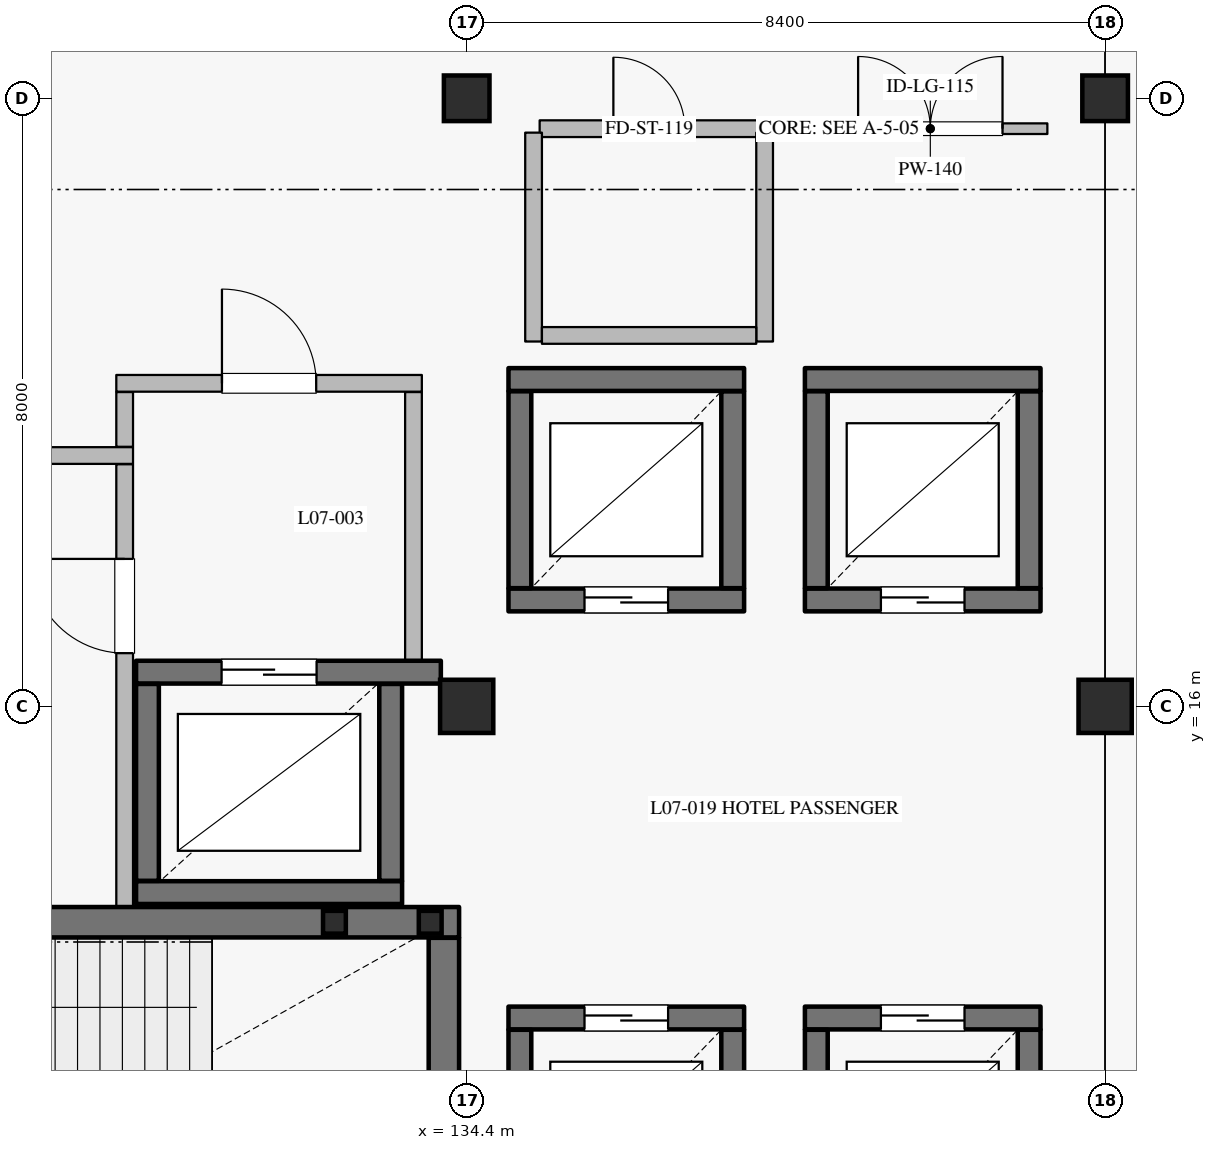
"""IFC4 building model, lengths in metres.
Left out: names, types, materials, properties, quantities, classifications, styles, units other than length and angle.
Written with IfcOpenShell. Run it as: python <this file> out.ifc"""

import sys

from ifc_helpers import new_model, si_unit, direction, frame, frame_2d, origin, origin_2d, place, context, subcontext, project, spatial, rectangle, hollow_rectangle, extrude, element, fill, save


model = new_model("IFC4")
c1 = context("Model", 3, precision=1e-05, world=origin(), true_north=direction((0.0, 1.0)))
c2 = subcontext(c1, "Body", "Model", "MODEL_VIEW")
j1 = project(units=[si_unit("LENGTHUNIT", "METRE"), si_unit("PLANEANGLEUNIT", "RADIAN")], contexts=[c1])
p1 = place(None, origin())
s1 = spatial("IfcSite", under=j1, at=p1, CompositionType="ELEMENT")
p2 = place(p1, origin())
s2 = spatial("IfcBuilding", under=s1, at=p2, CompositionType="ELEMENT")
p3 = place(p2, frame((0.0, 0.0, 32.4)))
s3 = spatial("IfcBuildingStorey", under=s2, at=p3, CompositionType="ELEMENT", Elevation=32.4)
for number, where, z_axis, x_axis in (
    (1, (134.4, 16.0, 0.0), (0.0, 0.0, 1.0), (1.0, 0.0, 0.0)),
    (2, (142.8, 16.0, 0.0), (0.0, 0.0, 1.0), (1.0, 0.0, 0.0)),
):
    element("IfcColumn", number, at=place(p3, frame(where, z_axis=z_axis, x_axis=x_axis)), inside=s3, PredefinedType="COLUMN", context=c2, shape_type="SweptSolid", body=[
        extrude(rectangle(XDim=0.7, YDim=0.7, at=origin_2d()), origin(), (0.0, 0.0, 1.0), 3.6),
    ])
for number, where, z_axis, x_axis in (
    (3, (134.4, 24.0, 0.0), (0.0, 0.0, 1.0), (1.0, 0.0, 0.0)),
    (4, (142.8, 24.0, 0.0), (0.0, 0.0, 1.0), (1.0, 0.0, 0.0)),
):
    element("IfcColumn", number, at=place(p3, frame(where, z_axis=z_axis, x_axis=x_axis)), inside=s3, PredefinedType="COLUMN", context=c2, shape_type="SweptSolid", body=[
        extrude(rectangle(XDim=0.6, YDim=0.6, at=origin_2d()), origin(), (0.0, 0.0, 1.0), 3.6),
    ])
p4 = place(p3, frame((134.95, 17.4, 0.0), z_axis=(0.0, 0.0, 1.0), x_axis=(1.0, 0.0, 0.0)))
e5 = element("IfcWall", 5, at=p4, inside=s3, PredefinedType="SHEAR", context=c2, shape_type="SweptSolid", body=[
    extrude(rectangle(XDim=3.1, YDim=0.3, at=frame_2d((1.55, 0.0))), origin(), (0.0, 0.0, 1.0), 3.335),
])
p5 = place(p4, frame((1.0, 0.0, 0.0)))
e6 = element("IfcOpeningElement", 6, at=p5, cuts=e5, PredefinedType="OPENING", context=c2, shape_type="SweptSolid", body=[
    extrude(rectangle(XDim=1.1, YDim=2.2, at=frame_2d((0.55, 1.1))), frame((0.0, 0.16, 0.0), z_axis=(0.0, -1.0, 0.0), x_axis=(1.0, 0.0, 0.0)), (0.0, 0.0, 1.0), 0.32),
])
p6 = place(p3, frame((137.9, 17.555, 0.0), z_axis=(0.0, 0.0, 1.0), x_axis=(0.0, 1.0, 0.0)))
e7 = element("IfcWall", 7, at=p6, inside=s3, PredefinedType="SHEAR", context=c2, shape_type="SweptSolid", body=[
    extrude(rectangle(XDim=2.59, YDim=0.3, at=frame_2d((1.295, 0.0))), origin(), (0.0, 0.0, 1.0), 3.335),
])
p7 = place(p3, frame((138.05, 20.3, 0.0), z_axis=(0.0, 0.0, 1.0), x_axis=(-1.0, 0.0, 0.0)))
e8 = element("IfcWall", 8, at=p7, inside=s3, PredefinedType="SHEAR", context=c2, shape_type="SweptSolid", body=[
    extrude(rectangle(XDim=3.1, YDim=0.3, at=frame_2d((1.55, 0.0))), origin(), (0.0, 0.0, 1.0), 3.335),
])
p8 = place(p3, frame((135.1, 20.145, 0.0), z_axis=(0.0, 0.0, 1.0), x_axis=(0.0, -1.0, 0.0)))
e9 = element("IfcWall", 9, at=p8, inside=s3, PredefinedType="SHEAR", context=c2, shape_type="SweptSolid", body=[
    extrude(rectangle(XDim=2.59, YDim=0.3, at=frame_2d((1.295, 0.0))), origin(), (0.0, 0.0, 1.0), 3.335),
])
p9 = place(p3, frame((138.85, 17.4, 0.0), z_axis=(0.0, 0.0, 1.0), x_axis=(1.0, 0.0, 0.0)))
e10 = element("IfcWall", 10, at=p9, inside=s3, PredefinedType="SHEAR", context=c2, shape_type="SweptSolid", body=[
    extrude(rectangle(XDim=3.1, YDim=0.3, at=frame_2d((1.55, 0.0))), origin(), (0.0, 0.0, 1.0), 3.335),
])
p10 = place(p9, frame((1.0, 0.0, 0.0)))
e11 = element("IfcOpeningElement", 11, at=p10, cuts=e10, PredefinedType="OPENING", context=c2, shape_type="SweptSolid", body=[
    extrude(rectangle(XDim=1.1, YDim=2.2, at=frame_2d((0.55, 1.1))), frame((0.0, 0.16, 0.0), z_axis=(0.0, -1.0, 0.0), x_axis=(1.0, 0.0, 0.0)), (0.0, 0.0, 1.0), 0.32),
])
p11 = place(p3, frame((141.8, 17.555, 0.0), z_axis=(0.0, 0.0, 1.0), x_axis=(0.0, 1.0, 0.0)))
e12 = element("IfcWall", 12, at=p11, inside=s3, PredefinedType="SHEAR", context=c2, shape_type="SweptSolid", body=[
    extrude(rectangle(XDim=2.59, YDim=0.3, at=frame_2d((1.295, 0.0))), origin(), (0.0, 0.0, 1.0), 3.335),
])
p12 = place(p3, frame((141.95, 20.3, 0.0), z_axis=(0.0, 0.0, 1.0), x_axis=(-1.0, 0.0, 0.0)))
e13 = element("IfcWall", 13, at=p12, inside=s3, PredefinedType="SHEAR", context=c2, shape_type="SweptSolid", body=[
    extrude(rectangle(XDim=3.1, YDim=0.3, at=frame_2d((1.55, 0.0))), origin(), (0.0, 0.0, 1.0), 3.335),
])
for number, where, z_axis, x_axis in (
    (14, (139.0, 20.145, 0.0), (0.0, 0.0, 1.0), (0.0, -1.0, 0.0)),
    (15, (137.9, 9.155, 0.0), (0.0, 0.0, 1.0), (0.0, 1.0, 0.0)),
):
    element("IfcWall", number, at=place(p3, frame(where, z_axis=z_axis, x_axis=x_axis)), inside=s3, PredefinedType="SHEAR", context=c2, shape_type="SweptSolid", body=[
        extrude(rectangle(XDim=2.59, YDim=0.3, at=frame_2d((1.295, 0.0))), origin(), (0.0, 0.0, 1.0), 3.335),
    ])
p13 = place(p3, frame((138.05, 11.9, 0.0), z_axis=(0.0, 0.0, 1.0), x_axis=(-1.0, 0.0, 0.0)))
e16 = element("IfcWall", 16, at=p13, inside=s3, PredefinedType="SHEAR", context=c2, shape_type="SweptSolid", body=[
    extrude(rectangle(XDim=3.1, YDim=0.3, at=frame_2d((1.55, 0.0))), origin(), (0.0, 0.0, 1.0), 3.335),
])
p14 = place(p13, frame((1.0, 0.0, 0.0)))
e17 = element("IfcOpeningElement", 17, at=p14, cuts=e16, PredefinedType="OPENING", context=c2, shape_type="SweptSolid", body=[
    extrude(rectangle(XDim=1.1, YDim=2.2, at=frame_2d((0.55, 1.1))), frame((0.0, 0.16, 0.0), z_axis=(0.0, -1.0, 0.0), x_axis=(1.0, 0.0, 0.0)), (0.0, 0.0, 1.0), 0.32),
])
for number, where, z_axis, x_axis in (
    (18, (135.1, 11.745, 0.0), (0.0, 0.0, 1.0), (0.0, -1.0, 0.0)),
    (19, (141.8, 9.155, 0.0), (0.0, 0.0, 1.0), (0.0, 1.0, 0.0)),
):
    element("IfcWall", number, at=place(p3, frame(where, z_axis=z_axis, x_axis=x_axis)), inside=s3, PredefinedType="SHEAR", context=c2, shape_type="SweptSolid", body=[
        extrude(rectangle(XDim=2.59, YDim=0.3, at=frame_2d((1.295, 0.0))), origin(), (0.0, 0.0, 1.0), 3.335),
    ])
p15 = place(p3, frame((141.95, 11.9, 0.0), z_axis=(0.0, 0.0, 1.0), x_axis=(-1.0, 0.0, 0.0)))
e20 = element("IfcWall", 20, at=p15, inside=s3, PredefinedType="SHEAR", context=c2, shape_type="SweptSolid", body=[
    extrude(rectangle(XDim=3.1, YDim=0.3, at=frame_2d((1.55, 0.0))), origin(), (0.0, 0.0, 1.0), 3.335),
])
p16 = place(p15, frame((1.0, 0.0, 0.0)))
e21 = element("IfcOpeningElement", 21, at=p16, cuts=e20, PredefinedType="OPENING", context=c2, shape_type="SweptSolid", body=[
    extrude(rectangle(XDim=1.1, YDim=2.2, at=frame_2d((0.55, 1.1))), frame((0.0, 0.16, 0.0), z_axis=(0.0, -1.0, 0.0), x_axis=(1.0, 0.0, 0.0)), (0.0, 0.0, 1.0), 0.32),
])
p17 = place(p3, frame((139.0, 11.745, 0.0), z_axis=(0.0, 0.0, 1.0), x_axis=(0.0, -1.0, 0.0)))
e22 = element("IfcWall", 22, at=p17, inside=s3, PredefinedType="SHEAR", context=c2, shape_type="SweptSolid", body=[
    extrude(rectangle(XDim=2.59, YDim=0.3, at=frame_2d((1.295, 0.0))), origin(), (0.0, 0.0, 1.0), 3.335),
])
p18 = place(p3, frame((130.05, 13.55, 0.0), z_axis=(0.0, 0.0, 1.0), x_axis=(1.0, 0.0, 0.0)))
e23 = element("IfcWall", 23, at=p18, inside=s3, PredefinedType="SHEAR", context=c2, shape_type="SweptSolid", body=[
    extrude(rectangle(XDim=3.5, YDim=0.3, at=frame_2d((1.75, 0.0))), origin(), (0.0, 0.0, 1.0), 3.335),
])
p19 = place(p3, frame((133.4, 13.705, 0.0), z_axis=(0.0, 0.0, 1.0), x_axis=(0.0, 1.0, 0.0)))
e24 = element("IfcWall", 24, at=p19, inside=s3, PredefinedType="SHEAR", context=c2, shape_type="SweptSolid", body=[
    extrude(rectangle(XDim=2.59, YDim=0.3, at=frame_2d((1.295, 0.0))), origin(), (0.0, 0.0, 1.0), 3.335),
])
p20 = place(p3, frame((134.06, 16.45, 0.0), z_axis=(0.0, 0.0, 1.0), x_axis=(-1.0, 0.0, 0.0)))
e25 = element("IfcWall", 25, at=p20, inside=s3, PredefinedType="SHEAR", context=c2, shape_type="SweptSolid", body=[
    extrude(rectangle(XDim=4.01, YDim=0.3, at=frame_2d((2.005, 0.0))), origin(), (0.0, 0.0, 1.0), 3.335),
])
p21 = place(p20, frame((1.635, 0.0, 0.0)))
e26 = element("IfcOpeningElement", 26, at=p21, cuts=e25, PredefinedType="OPENING", context=c2, shape_type="SweptSolid", body=[
    extrude(rectangle(XDim=1.25, YDim=2.25, at=frame_2d((0.625, 1.125))), frame((0.0, 0.16, 0.0), z_axis=(0.0, -1.0, 0.0), x_axis=(1.0, 0.0, 0.0)), (0.0, 0.0, 1.0), 0.32),
])
p22 = place(p3, frame((130.2, 16.295, 0.0), z_axis=(0.0, 0.0, 1.0), x_axis=(0.0, -1.0, 0.0)))
e27 = element("IfcWall", 27, at=p22, inside=s3, PredefinedType="SHEAR", context=c2, shape_type="SweptSolid", body=[
    extrude(rectangle(XDim=2.59, YDim=0.3, at=frame_2d((1.295, 0.0))), origin(), (0.0, 0.0, 1.0), 3.335),
])
p23 = place(p3, frame((134.1, 9.005, 0.0), z_axis=(0.0, 0.0, 1.0), x_axis=(0.0, 1.0, 0.0)))
e28 = element("IfcWall", 28, at=p23, inside=s3, PredefinedType="SHEAR", context=c2, shape_type="SweptSolid", body=[
    extrude(rectangle(XDim=3.95, YDim=0.4, at=frame_2d((1.975, 0.0))), origin(), (0.0, 0.0, 1.0), 3.335),
])
p24 = place(p3, frame((126.1, 13.16, 0.0), z_axis=(0.0, 0.0, 1.0), x_axis=(1.0, 0.0, 0.0)))
e29 = element("IfcWall", 29, at=p24, inside=s3, PredefinedType="SHEAR", context=c2, shape_type="SweptSolid", body=[
    extrude(rectangle(XDim=8.2, YDim=0.4, at=frame_2d((4.1, 0.0))), origin(), (0.0, 0.0, 1.0), 3.335),
])
p25 = place(p24, frame((0.43, 0.0, 0.0)))
e30 = element("IfcOpeningElement", 30, at=p25, cuts=e29, PredefinedType="OPENING", context=c2, shape_type="SweptSolid", body=[
    extrude(rectangle(XDim=1.16, YDim=2.2, at=frame_2d((0.58, 1.1))), frame((0.0, 0.21, 0.0), z_axis=(0.0, -1.0, 0.0), x_axis=(1.0, 0.0, 0.0)), (0.0, 0.0, 1.0), 0.42),
])
p26 = place(p3, frame((126.19, 19.3, 0.0), z_axis=(0.0, 0.0, 1.0), x_axis=(1.0, 0.0, 0.0)))
e31 = element("IfcWall", 31, at=p26, inside=s3, PredefinedType="PARTITIONING", context=c2, shape_type="SweptSolid", body=[
    extrude(rectangle(XDim=3.82, YDim=0.22, at=frame_2d((1.91, 0.0))), origin(), (0.0, 0.0, 1.0), 3.335),
])
p27 = place(p26, frame((1.35, 0.0, 0.0)))
e32 = element("IfcOpeningElement", 32, at=p27, cuts=e31, PredefinedType="OPENING", context=c2, shape_type="SweptSolid", body=[
    extrude(rectangle(XDim=1.12, YDim=2.2, at=frame_2d((0.56, 1.1))), frame((0.0, 0.12, 0.0), z_axis=(0.0, -1.0, 0.0), x_axis=(1.0, 0.0, 0.0)), (0.0, 0.0, 1.0), 0.24),
])
p28 = place(p3, frame((129.9, 13.365, 0.0), z_axis=(0.0, 0.0, 1.0), x_axis=(0.0, 1.0, 0.0)))
e33 = element("IfcWall", 33, at=p28, inside=s3, PredefinedType="PARTITIONING", context=c2, shape_type="SweptSolid", body=[
    extrude(rectangle(XDim=5.82, YDim=0.22, at=frame_2d((2.91, 0.0))), origin(), (0.0, 0.0, 1.0), 3.335),
])
p29 = place(p28, frame((3.335, 0.0, 0.0)))
e34 = element("IfcOpeningElement", 34, at=p29, cuts=e33, PredefinedType="OPENING", context=c2, shape_type="SweptSolid", body=[
    extrude(rectangle(XDim=1.24, YDim=2.2, at=frame_2d((0.62, 1.1))), frame((0.0, 0.12, 0.0), z_axis=(0.0, -1.0, 0.0), x_axis=(1.0, 0.0, 0.0)), (0.0, 0.0, 1.0), 0.24),
])
p30 = place(p3, frame((129.9, 19.415, 0.0), z_axis=(0.0, 0.0, 1.0), x_axis=(0.0, 1.0, 0.0)))
e35 = element("IfcWall", 35, at=p30, inside=s3, PredefinedType="PARTITIONING", context=c2, shape_type="SweptSolid", body=[
    extrude(rectangle(XDim=0.72, YDim=0.22, at=frame_2d((0.36, 0.0))), origin(), (0.0, 0.0, 1.0), 3.335),
])
p31 = place(p3, frame((133.7, 16.605, 0.0), z_axis=(0.0, 0.0, 1.0), x_axis=(0.0, 1.0, 0.0)))
e36 = element("IfcWall", 36, at=p31, inside=s3, PredefinedType="PARTITIONING", context=c2, shape_type="SweptSolid", body=[
    extrude(rectangle(XDim=3.53, YDim=0.22, at=frame_2d((1.765, 0.0))), origin(), (0.0, 0.0, 1.0), 3.335),
])
p32 = place(p3, frame((129.79, 20.25, 0.0), z_axis=(0.0, 0.0, 1.0), x_axis=(1.0, 0.0, 0.0)))
e37 = element("IfcWall", 37, at=p32, inside=s3, PredefinedType="PARTITIONING", context=c2, shape_type="SweptSolid", body=[
    extrude(rectangle(XDim=4.02, YDim=0.22, at=frame_2d((2.01, 0.0))), origin(), (0.0, 0.0, 1.0), 3.335),
])
p33 = place(p32, frame((1.39, 0.0, 0.0)))
e38 = element("IfcOpeningElement", 38, at=p33, cuts=e37, PredefinedType="OPENING", context=c2, shape_type="SweptSolid", body=[
    extrude(rectangle(XDim=1.24, YDim=2.2, at=frame_2d((0.62, 1.1))), frame((0.0, 0.12, 0.0), z_axis=(0.0, -1.0, 0.0), x_axis=(1.0, 0.0, 0.0)), (0.0, 0.0, 1.0), 0.24),
])
for number, where, z_axis, x_axis in (
    (39, (132.66, 13.16, -1.8), (0.0, 0.0, 1.0), (1.0, 0.0, 0.0)),
    (40, (133.92, 13.16, -1.8), (0.0, 0.0, 1.0), (1.0, 0.0, 0.0)),
):
    element("IfcColumn", number, at=place(p3, frame(where, z_axis=z_axis, x_axis=x_axis)), inside=s3, PredefinedType="COLUMN", context=c2, shape_type="SweptSolid", body=[
        extrude(hollow_rectangle(XDim=0.3, YDim=0.3, WallThickness=0.012, at=origin_2d()), origin(), (0.0, 0.0, 1.0), 3.42),
    ])
p34 = place(p3, frame((138.96, 23.6, 0.0), z_axis=(0.0, 0.0, 1.0), x_axis=(1.0, 0.0, 0.0)))
e41 = element("IfcWall", 41, at=p34, inside=s3, PredefinedType="PARTITIONING", context=c2, shape_type="SweptSolid", body=[
    extrude(rectangle(XDim=3.08, YDim=0.14, at=frame_2d((1.54, 0.0))), origin(), (0.0, 0.0, 1.0), 3.335),
])
p35 = place(p34, frame((0.59, 0.0, 0.0)))
e42 = element("IfcOpeningElement", 42, at=p35, cuts=e41, PredefinedType="OPENING", context=c2, shape_type="SweptSolid", body=[
    extrude(rectangle(XDim=1.9, YDim=2.4, at=frame_2d((0.95, 1.2))), frame((0.0, 0.08, 0.0), z_axis=(0.0, -1.0, 0.0), x_axis=(1.0, 0.0, 0.0)), (0.0, 0.0, 1.0), 0.16),
])
p36 = place(p3, frame((135.36, 23.6, 0.0), z_axis=(0.0, 0.0, 1.0), x_axis=(1.0, 0.0, 0.0)))
e43 = element("IfcWall", 43, at=p36, inside=s3, PredefinedType="PARTITIONING", context=c2, shape_type="SweptSolid", body=[
    extrude(rectangle(XDim=2.88, YDim=0.22, at=frame_2d((1.44, 0.0))), origin(), (0.0, 0.0, 1.0), 3.335),
])
p37 = place(p36, frame((0.97, 0.0, 0.0)))
e44 = element("IfcOpeningElement", 44, at=p37, cuts=e43, PredefinedType="OPENING", context=c2, shape_type="SweptSolid", body=[
    extrude(rectangle(XDim=0.94, YDim=2.15, at=frame_2d((0.47, 1.075))), frame((0.0, 0.12, 0.0), z_axis=(0.0, -1.0, 0.0), x_axis=(1.0, 0.0, 0.0)), (0.0, 0.0, 1.0), 0.24),
])
for number, where, z_axis, x_axis in (
    (45, (135.28, 20.8, 0.0), (0.0, 0.0, 1.0), (0.0, 1.0, 0.0)),
    (46, (138.32, 20.8, 0.0), (0.0, 0.0, 1.0), (0.0, 1.0, 0.0)),
):
    element("IfcWall", number, at=place(p3, frame(where, z_axis=z_axis, x_axis=x_axis)), inside=s3, PredefinedType="PARTITIONING", context=c2, shape_type="SweptSolid", body=[
        extrude(rectangle(XDim=2.748, YDim=0.22, at=frame_2d((1.374, 0.0))), origin(), (0.0, 0.0, 1.0), 3.335),
    ])
p38 = place(p3, frame((135.39, 20.88, 0.0), z_axis=(0.0, 0.0, 1.0), x_axis=(1.0, 0.0, 0.0)))
e47 = element("IfcWall", 47, at=p38, inside=s3, PredefinedType="PARTITIONING", context=c2, shape_type="SweptSolid", body=[
    extrude(rectangle(XDim=2.82, YDim=0.22, at=frame_2d((1.41, 0.0))), origin(), (0.0, 0.0, 1.0), 3.335),
])
p39 = place(p5, origin())
e48 = element("IfcDoor", 48, at=p39, inside=s3, OperationType="DOUBLE_DOOR_SLIDING", PredefinedType="DOOR", context=c2, shape_type="SweptSolid", body=[
    extrude(rectangle(XDim=1.1, YDim=2.2, at=frame_2d((0.55, 1.1))), frame((0.0, 0.025, 0.0), z_axis=(0.0, -1.0, 0.0), x_axis=(1.0, 0.0, 0.0)), (0.0, 0.0, 1.0), 0.05),
])
fill(e6, e48)
p40 = place(p10, origin())
e49 = element("IfcDoor", 49, at=p40, inside=s3, OperationType="DOUBLE_DOOR_SLIDING", PredefinedType="DOOR", context=c2, shape_type="SweptSolid", body=[
    extrude(rectangle(XDim=1.1, YDim=2.2, at=frame_2d((0.55, 1.1))), frame((0.0, 0.025, 0.0), z_axis=(0.0, -1.0, 0.0), x_axis=(1.0, 0.0, 0.0)), (0.0, 0.0, 1.0), 0.05),
])
fill(e11, e49)
p41 = place(p14, origin())
e50 = element("IfcDoor", 50, at=p41, inside=s3, OperationType="DOUBLE_DOOR_SLIDING", PredefinedType="DOOR", context=c2, shape_type="SweptSolid", body=[
    extrude(rectangle(XDim=1.1, YDim=2.2, at=frame_2d((0.55, 1.1))), frame((0.0, 0.025, 0.0), z_axis=(0.0, -1.0, 0.0), x_axis=(1.0, 0.0, 0.0)), (0.0, 0.0, 1.0), 0.05),
])
fill(e17, e50)
p42 = place(p16, origin())
e51 = element("IfcDoor", 51, at=p42, inside=s3, OperationType="DOUBLE_DOOR_SLIDING", PredefinedType="DOOR", context=c2, shape_type="SweptSolid", body=[
    extrude(rectangle(XDim=1.1, YDim=2.2, at=frame_2d((0.55, 1.1))), frame((0.0, 0.025, 0.0), z_axis=(0.0, -1.0, 0.0), x_axis=(1.0, 0.0, 0.0)), (0.0, 0.0, 1.0), 0.05),
])
fill(e21, e51)
p43 = place(p21, origin())
e52 = element("IfcDoor", 52, at=p43, inside=s3, OperationType="DOUBLE_DOOR_SLIDING", PredefinedType="DOOR", context=c2, shape_type="SweptSolid", body=[
    extrude(rectangle(XDim=1.25, YDim=2.25, at=frame_2d((0.625, 1.125))), frame((0.0, 0.025, 0.0), z_axis=(0.0, -1.0, 0.0), x_axis=(1.0, 0.0, 0.0)), (0.0, 0.0, 1.0), 0.05),
])
fill(e26, e52)
p44 = place(p29, origin())
e53 = element("IfcDoor", 53, at=p44, inside=s3, OperationType="SINGLE_SWING_RIGHT", PredefinedType="DOOR", context=c2, shape_type="SweptSolid", body=[
    extrude(rectangle(XDim=1.24, YDim=2.2, at=frame_2d((0.62, 1.1))), frame((0.0, 0.025, 0.0), z_axis=(0.0, -1.0, 0.0), x_axis=(1.0, 0.0, 0.0)), (0.0, 0.0, 1.0), 0.05),
])
fill(e34, e53)
p45 = place(p33, origin())
e54 = element("IfcDoor", 54, at=p45, inside=s3, OperationType="SINGLE_SWING_LEFT", PredefinedType="DOOR", context=c2, shape_type="SweptSolid", body=[
    extrude(rectangle(XDim=1.24, YDim=2.2, at=frame_2d((0.62, 1.1))), frame((0.0, 0.025, 0.0), z_axis=(0.0, -1.0, 0.0), x_axis=(1.0, 0.0, 0.0)), (0.0, 0.0, 1.0), 0.05),
])
fill(e38, e54)
p46 = place(p35, origin())
e55 = element("IfcDoor", 55, at=p46, inside=s3, OperationType="DOUBLE_DOOR_SINGLE_SWING", PredefinedType="DOOR", context=c2, shape_type="SweptSolid", body=[
    extrude(rectangle(XDim=1.9, YDim=2.4, at=frame_2d((0.95, 1.2))), frame((0.0, 0.025, 0.0), z_axis=(0.0, -1.0, 0.0), x_axis=(1.0, 0.0, 0.0)), (0.0, 0.0, 1.0), 0.05),
])
fill(e42, e55)
p47 = place(p37, origin())
e56 = element("IfcDoor", 56, at=p47, inside=s3, OperationType="SINGLE_SWING_LEFT", PredefinedType="DOOR", context=c2, shape_type="SweptSolid", body=[
    extrude(rectangle(XDim=0.94, YDim=2.15, at=frame_2d((0.47, 1.075))), frame((0.0, 0.025, 0.0), z_axis=(0.0, -1.0, 0.0), x_axis=(1.0, 0.0, 0.0)), (0.0, 0.0, 1.0), 0.05),
])
fill(e44, e56)
save(model, sys.argv[1])
